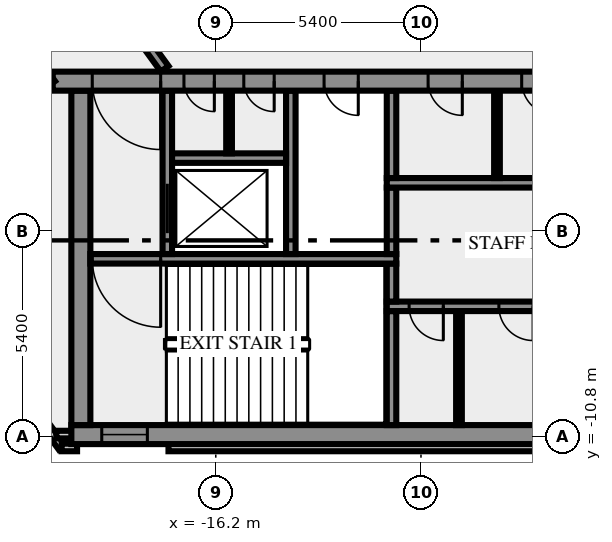
"""IFC4 building model, lengths in metres.
Left out: names, types, materials, properties, quantities, classifications, styles, units other than length and angle.
Written with IfcOpenShell. Run it as: python <this file> out.ifc"""

import sys

from ifc_helpers import new_model, si_unit, direction, frame, frame_2d, origin, place, context, subcontext, project, spatial, rectangle, extrude, element, fill, save


model = new_model("IFC4")
c1 = context("Model", 3, precision=1e-05, world=origin(), true_north=direction((0.0, 1.0)))
c2 = subcontext(c1, "Body", "Model", "MODEL_VIEW")
j1 = project(units=[si_unit("LENGTHUNIT", "METRE"), si_unit("PLANEANGLEUNIT", "RADIAN")], contexts=[c1])
p1 = place(None, origin())
s1 = spatial("IfcSite", under=j1, at=p1, CompositionType="ELEMENT")
p2 = place(p1, origin())
s2 = spatial("IfcBuilding", under=s1, at=p2, CompositionType="ELEMENT")
p3 = place(p2, frame((0.0, 0.0, 226.0)))
s3 = spatial("IfcBuildingStorey", under=s2, at=p3, CompositionType="ELEMENT", Elevation=226.0)
p4 = place(p3, frame((-21.833, -8.909, 0.0), z_axis=(0.0, 0.0, 1.0), x_axis=(0.587766567315, -0.809030569476, 0.0)))
e1 = element("IfcWall", 1, at=p4, inside=s3, PredefinedType="SOLIDWALL", context=c2, shape_type="SweptSolid", body=[
    extrude(rectangle(XDim=2.688, YDim=0.2, at=frame_2d((1.344, 0.0))), origin(), (0.0, 0.0, 1.0), 3.65),
])
p5 = place(p3, frame((-20.256, -11.088, 0.0), z_axis=(0.0, 0.0, 1.0), x_axis=(1.0, 0.0, 0.0)))
e2 = element("IfcWall", 2, at=p5, inside=s3, PredefinedType="SOLIDWALL", context=c2, shape_type="SweptSolid", body=[
    extrude(rectangle(XDim=0.406, YDim=0.2, at=frame_2d((0.203, 0.0))), origin(), (0.0, 0.0, 1.0), 3.65),
])
p6 = place(p3, frame((-17.444, -11.088, 0.0), z_axis=(0.0, 0.0, 1.0), x_axis=(1.0, 0.0, 0.0)))
e3 = element("IfcWall", 3, at=p6, inside=s3, PredefinedType="SOLIDWALL", context=c2, shape_type="SweptSolid", body=[
    extrude(rectangle(XDim=34.888, YDim=0.2, at=frame_2d((17.444, 0.0))), origin(), (0.0, 0.0, 1.0), 3.65),
])
p7 = place(p3, frame((-19.98, -10.75, 0.0), z_axis=(0.0, 0.0, 1.0), x_axis=(-1.0, 0.0, 0.0)))
e4 = element("IfcWall", 4, at=p7, inside=s3, PredefinedType="SOLIDWALL", context=c2, shape_type="SweptSolid", body=[
    extrude(rectangle(XDim=0.417, YDim=0.2, at=frame_2d((0.208, 0.0))), origin(), (0.0, 0.0, 1.0), 3.65),
])
p8 = place(p3, frame((-20.0, -10.75, 0.0), z_axis=(0.0, 0.0, 1.0), x_axis=(1.0, 0.0, 0.0)))
e5 = element("IfcWall", 5, at=p8, inside=s3, PredefinedType="SHEAR", context=c2, shape_type="SweptSolid", body=[
    extrude(rectangle(XDim=40.0, YDim=0.5, at=frame_2d((20.0, 0.0))), origin(), (0.0, 0.0, 1.0), 3.65),
])
p9 = place(p8, frame((0.8, 0.0, 1.0)))
e6 = element("IfcOpeningElement", 6, at=p9, cuts=e5, PredefinedType="OPENING", context=c2, shape_type="SweptSolid", body=[
    extrude(rectangle(XDim=1.2, YDim=1.2, at=frame_2d((0.6, 0.6))), frame((0.0, 0.26, 0.0), z_axis=(0.0, -1.0, 0.0), x_axis=(1.0, 0.0, 0.0)), (0.0, 0.0, 1.0), 0.52),
])
p10 = place(p8, frame((38.0, 0.0, 1.0)))
e7 = element("IfcOpeningElement", 7, at=p10, cuts=e5, PredefinedType="OPENING", context=c2, shape_type="SweptSolid", body=[
    extrude(rectangle(XDim=1.2, YDim=1.2, at=frame_2d((0.6, 0.6))), frame((0.0, 0.26, 0.0), z_axis=(0.0, -1.0, 0.0), x_axis=(1.0, 0.0, 0.0)), (0.0, 0.0, 1.0), 0.52),
])
p11 = place(p3, frame((-19.75, -10.5, 0.0), z_axis=(0.0, 0.0, 1.0), x_axis=(0.0, 1.0, 0.0)))
e8 = element("IfcWall", 8, at=p11, inside=s3, PredefinedType="SHEAR", context=c2, shape_type="SweptSolid", body=[
    extrude(rectangle(XDim=8.8, YDim=0.5, at=frame_2d((4.4, 0.0))), origin(), (0.0, 0.0, 1.0), 3.65),
])
p12 = place(p3, frame((-11.575, -10.5, 0.0), z_axis=(0.0, 0.0, 1.0), x_axis=(0.0, 1.0, 0.0)))
e9 = element("IfcWall", 9, at=p12, inside=s3, PredefinedType="SHEAR", context=c2, shape_type="SweptSolid", body=[
    extrude(rectangle(XDim=3.0, YDim=0.25, at=frame_2d((1.5, 0.0))), origin(), (0.0, 0.0, 1.0), 3.65),
])
p13 = place(p3, frame((-9.8, -10.5, 0.0), z_axis=(0.0, 0.0, 1.0), x_axis=(0.0, 1.0, 0.0)))
e10 = element("IfcWall", 10, at=p13, inside=s3, PredefinedType="PARTITIONING", context=c2, shape_type="SweptSolid", body=[
    extrude(rectangle(XDim=3.0, YDim=0.15, at=frame_2d((1.5, 0.0))), origin(), (0.0, 0.0, 1.0), 3.65),
])
p14 = place(p3, frame((11.7, -7.375, 0.0), z_axis=(0.0, 0.0, 1.0), x_axis=(-1.0, 0.0, 0.0)))
e11 = element("IfcWall", 11, at=p14, inside=s3, PredefinedType="SHEAR", context=c2, shape_type="SweptSolid", body=[
    extrude(rectangle(XDim=23.4, YDim=0.25, at=frame_2d((11.7, 0.0))), origin(), (0.0, 0.0, 1.0), 3.65),
])
p15 = place(p14, frame((21.912, 0.0, 0.0)))
e12 = element("IfcOpeningElement", 12, at=p15, cuts=e11, PredefinedType="OPENING", context=c2, shape_type="SweptSolid", body=[
    extrude(rectangle(XDim=0.9, YDim=2.1, at=frame_2d((0.45, 1.05))), frame((0.0, 0.135, 0.0), z_axis=(0.0, -1.0, 0.0), x_axis=(1.0, 0.0, 0.0)), (0.0, 0.0, 1.0), 0.27),
])
p16 = place(p14, frame((19.55, 0.0, 0.0)))
e13 = element("IfcOpeningElement", 13, at=p16, cuts=e11, PredefinedType="OPENING", context=c2, shape_type="SweptSolid", body=[
    extrude(rectangle(XDim=0.9, YDim=2.1, at=frame_2d((0.45, 1.05))), frame((0.0, 0.135, 0.0), z_axis=(0.0, -1.0, 0.0), x_axis=(1.0, 0.0, 0.0)), (0.0, 0.0, 1.0), 0.27),
])
p17 = place(p14, frame((16.688, 0.0, 0.0)))
e14 = element("IfcOpeningElement", 14, at=p17, cuts=e11, PredefinedType="OPENING", context=c2, shape_type="SweptSolid", body=[
    extrude(rectangle(XDim=0.9, YDim=2.1, at=frame_2d((0.45, 1.05))), frame((0.0, 0.135, 0.0), z_axis=(0.0, -1.0, 0.0), x_axis=(1.0, 0.0, 0.0)), (0.0, 0.0, 1.0), 0.27),
])
p18 = place(p14, frame((14.4, 0.0, 0.0)))
e15 = element("IfcOpeningElement", 15, at=p18, cuts=e11, PredefinedType="OPENING", context=c2, shape_type="SweptSolid", body=[
    extrude(rectangle(XDim=0.9, YDim=2.1, at=frame_2d((0.45, 1.05))), frame((0.0, 0.135, 0.0), z_axis=(0.0, -1.0, 0.0), x_axis=(1.0, 0.0, 0.0)), (0.0, 0.0, 1.0), 0.27),
])
p19 = place(p14, frame((12.5, 0.0, 0.0)))
e16 = element("IfcOpeningElement", 16, at=p19, cuts=e11, PredefinedType="OPENING", context=c2, shape_type="SweptSolid", body=[
    extrude(rectangle(XDim=0.9, YDim=2.1, at=frame_2d((0.45, 1.05))), frame((0.0, 0.135, 0.0), z_axis=(0.0, -1.0, 0.0), x_axis=(1.0, 0.0, 0.0)), (0.0, 0.0, 1.0), 0.27),
])
p20 = place(p14, frame((10.6, 0.0, 0.0)))
e17 = element("IfcOpeningElement", 17, at=p20, cuts=e11, PredefinedType="OPENING", context=c2, shape_type="SweptSolid", body=[
    extrude(rectangle(XDim=0.9, YDim=2.1, at=frame_2d((0.45, 1.05))), frame((0.0, 0.135, 0.0), z_axis=(0.0, -1.0, 0.0), x_axis=(1.0, 0.0, 0.0)), (0.0, 0.0, 1.0), 0.27),
])
p21 = place(p14, frame((8.35, 0.0, 0.0)))
e18 = element("IfcOpeningElement", 18, at=p21, cuts=e11, PredefinedType="OPENING", context=c2, shape_type="SweptSolid", body=[
    extrude(rectangle(XDim=1.1, YDim=2.1, at=frame_2d((0.55, 1.05))), frame((0.0, 0.135, 0.0), z_axis=(0.0, -1.0, 0.0), x_axis=(1.0, 0.0, 0.0)), (0.0, 0.0, 1.0), 0.27),
])
p22 = place(p14, frame((5.85, 0.0, 0.0)))
e19 = element("IfcOpeningElement", 19, at=p22, cuts=e11, PredefinedType="OPENING", context=c2, shape_type="SweptSolid", body=[
    extrude(rectangle(XDim=1.1, YDim=2.1, at=frame_2d((0.55, 1.05))), frame((0.0, 0.135, 0.0), z_axis=(0.0, -1.0, 0.0), x_axis=(1.0, 0.0, 0.0)), (0.0, 0.0, 1.0), 0.27),
])
p23 = place(p14, frame((3.35, 0.0, 0.0)))
e20 = element("IfcOpeningElement", 20, at=p23, cuts=e11, PredefinedType="OPENING", context=c2, shape_type="SweptSolid", body=[
    extrude(rectangle(XDim=1.1, YDim=2.1, at=frame_2d((0.55, 1.05))), frame((0.0, 0.135, 0.0), z_axis=(0.0, -1.0, 0.0), x_axis=(1.0, 0.0, 0.0)), (0.0, 0.0, 1.0), 0.27),
])
p24 = place(p14, frame((0.85, 0.0, 0.0)))
e21 = element("IfcOpeningElement", 21, at=p24, cuts=e11, PredefinedType="OPENING", context=c2, shape_type="SweptSolid", body=[
    extrude(rectangle(XDim=1.1, YDim=2.1, at=frame_2d((0.55, 1.05))), frame((0.0, 0.135, 0.0), z_axis=(0.0, -1.0, 0.0), x_axis=(1.0, 0.0, 0.0)), (0.0, 0.0, 1.0), 0.27),
])
p25 = place(p3, frame((-11.575, -7.25, 0.0), z_axis=(0.0, 0.0, 1.0), x_axis=(0.0, 1.0, 0.0)))
e22 = element("IfcWall", 22, at=p25, inside=s3, PredefinedType="SHEAR", context=c2, shape_type="SweptSolid", body=[
    extrude(rectangle(XDim=1.0, YDim=0.25, at=frame_2d((0.5, 0.0))), origin(), (0.0, 0.0, 1.0), 3.65),
])
p26 = place(p3, frame((-11.45, -6.125, 0.0), z_axis=(0.0, 0.0, 1.0), x_axis=(-1.0, 0.0, 0.0)))
e23 = element("IfcWall", 23, at=p26, inside=s3, PredefinedType="SHEAR", context=c2, shape_type="SweptSolid", body=[
    extrude(rectangle(XDim=8.05, YDim=0.25, at=frame_2d((4.025, 0.0))), origin(), (0.0, 0.0, 1.0), 3.65),
])
p27 = place(p26, frame((6.2, 0.0, 0.0)))
e24 = element("IfcOpeningElement", 24, at=p27, cuts=e23, PredefinedType="OPENING", context=c2, shape_type="SweptSolid", body=[
    extrude(rectangle(XDim=1.8, YDim=2.1, at=frame_2d((0.9, 1.05))), frame((0.0, 0.135, 0.0), z_axis=(0.0, -1.0, 0.0), x_axis=(1.0, 0.0, 0.0)), (0.0, 0.0, 1.0), 0.27),
])
p28 = place(p3, frame((-17.475, -6.0, 0.0), z_axis=(0.0, 0.0, 1.0), x_axis=(0.0, 1.0, 0.0)))
e25 = element("IfcWall", 25, at=p28, inside=s3, PredefinedType="SHEAR", context=c2, shape_type="SweptSolid", body=[
    extrude(rectangle(XDim=4.3, YDim=0.25, at=frame_2d((2.15, 0.0))), origin(), (0.0, 0.0, 1.0), 3.65),
])
p29 = place(p28, frame((0.55, 0.0, 0.0)))
e26 = element("IfcOpeningElement", 26, at=p29, cuts=e25, PredefinedType="OPENING", context=c2, shape_type="SweptSolid", body=[
    extrude(rectangle(XDim=1.3, YDim=2.1, at=frame_2d((0.65, 1.05))), frame((0.0, 0.135, 0.0), z_axis=(0.0, -1.0, 0.0), x_axis=(1.0, 0.0, 0.0)), (0.0, 0.0, 1.0), 0.27),
])
p30 = place(p3, frame((-14.225, -6.0, 0.0), z_axis=(0.0, 0.0, 1.0), x_axis=(0.0, 1.0, 0.0)))
e27 = element("IfcWall", 27, at=p30, inside=s3, PredefinedType="SHEAR", context=c2, shape_type="SweptSolid", body=[
    extrude(rectangle(XDim=4.3, YDim=0.25, at=frame_2d((2.15, 0.0))), origin(), (0.0, 0.0, 1.0), 3.65),
])
p31 = place(p3, frame((-11.575, -6.0, 0.0), z_axis=(0.0, 0.0, 1.0), x_axis=(0.0, 1.0, 0.0)))
e28 = element("IfcWall", 28, at=p31, inside=s3, PredefinedType="SHEAR", context=c2, shape_type="SweptSolid", body=[
    extrude(rectangle(XDim=1.75, YDim=0.25, at=frame_2d((0.875, 0.0))), origin(), (0.0, 0.0, 1.0), 3.65),
])
p32 = place(p3, frame((-11.7, -4.125, 0.0), z_axis=(0.0, 0.0, 1.0), x_axis=(1.0, 0.0, 0.0)))
e29 = element("IfcWall", 29, at=p32, inside=s3, PredefinedType="SHEAR", context=c2, shape_type="SweptSolid", body=[
    extrude(rectangle(XDim=7.75, YDim=0.25, at=frame_2d((3.875, 0.0))), origin(), (0.0, 0.0, 1.0), 3.65),
])
p33 = place(p3, frame((-11.575, -4.0, 0.0), z_axis=(0.0, 0.0, 1.0), x_axis=(0.0, 1.0, 0.0)))
e30 = element("IfcWall", 30, at=p33, inside=s3, PredefinedType="SHEAR", context=c2, shape_type="SweptSolid", body=[
    extrude(rectangle(XDim=2.3, YDim=0.25, at=frame_2d((1.15, 0.0))), origin(), (0.0, 0.0, 1.0), 3.65),
])
p34 = place(p3, frame((-8.8, -4.0, 0.0), z_axis=(0.0, 0.0, 1.0), x_axis=(0.0, 1.0, 0.0)))
e31 = element("IfcWall", 31, at=p34, inside=s3, PredefinedType="PARTITIONING", context=c2, shape_type="SweptSolid", body=[
    extrude(rectangle(XDim=2.3, YDim=0.15, at=frame_2d((1.15, 0.0))), origin(), (0.0, 0.0, 1.0), 3.65),
])
p35 = place(p3, frame((-17.35, -3.475, 0.0), z_axis=(0.0, 0.0, 1.0), x_axis=(1.0, 0.0, 0.0)))
e32 = element("IfcWall", 32, at=p35, inside=s3, PredefinedType="SHEAR", context=c2, shape_type="SweptSolid", body=[
    extrude(rectangle(XDim=3.0, YDim=0.25, at=frame_2d((1.5, 0.0))), origin(), (0.0, 0.0, 1.0), 3.65),
])
p36 = place(p3, frame((-15.85, -3.35, 0.0), z_axis=(0.0, 0.0, 1.0), x_axis=(0.0, 1.0, 0.0)))
e33 = element("IfcWall", 33, at=p36, inside=s3, PredefinedType="PARTITIONING", context=c2, shape_type="SweptSolid", body=[
    extrude(rectangle(XDim=1.65, YDim=0.15, at=frame_2d((0.825, 0.0))), origin(), (0.0, 0.0, 1.0), 3.65),
])
p37 = place(p3, frame((20.49, -1.45, 0.0), z_axis=(0.0, 0.0, 1.0), x_axis=(-1.0, 0.0, 0.0)))
e34 = element("IfcWall", 34, at=p37, inside=s3, PredefinedType="SHEAR", context=c2, shape_type="SweptSolid", body=[
    extrude(rectangle(XDim=40.98, YDim=0.5, at=frame_2d((20.49, 0.0))), origin(), (0.0, 0.0, 1.0), 3.65),
])
p38 = place(p37, frame((38.14, 0.0, 0.0)))
e35 = element("IfcOpeningElement", 35, at=p38, cuts=e34, PredefinedType="OPENING", context=c2, shape_type="SweptSolid", body=[
    extrude(rectangle(XDim=1.8, YDim=2.1, at=frame_2d((0.9, 1.05))), frame((0.0, 0.26, 0.0), z_axis=(0.0, -1.0, 0.0), x_axis=(1.0, 0.0, 0.0)), (0.0, 0.0, 1.0), 0.52),
])
p39 = place(p37, frame((36.728, 0.0, 0.0)))
e36 = element("IfcOpeningElement", 36, at=p39, cuts=e34, PredefinedType="OPENING", context=c2, shape_type="SweptSolid", body=[
    extrude(rectangle(XDim=0.8, YDim=2.1, at=frame_2d((0.4, 1.05))), frame((0.0, 0.26, 0.0), z_axis=(0.0, -1.0, 0.0), x_axis=(1.0, 0.0, 0.0)), (0.0, 0.0, 1.0), 0.52),
])
p40 = place(p37, frame((35.153, 0.0, 0.0)))
e37 = element("IfcOpeningElement", 37, at=p40, cuts=e34, PredefinedType="OPENING", context=c2, shape_type="SweptSolid", body=[
    extrude(rectangle(XDim=0.8, YDim=2.1, at=frame_2d((0.4, 1.05))), frame((0.0, 0.26, 0.0), z_axis=(0.0, -1.0, 0.0), x_axis=(1.0, 0.0, 0.0)), (0.0, 0.0, 1.0), 0.52),
])
p41 = place(p37, frame((32.94, 0.0, 0.0)))
e38 = element("IfcOpeningElement", 38, at=p41, cuts=e34, PredefinedType="OPENING", context=c2, shape_type="SweptSolid", body=[
    extrude(rectangle(XDim=0.9, YDim=2.1, at=frame_2d((0.45, 1.05))), frame((0.0, 0.26, 0.0), z_axis=(0.0, -1.0, 0.0), x_axis=(1.0, 0.0, 0.0)), (0.0, 0.0, 1.0), 0.52),
])
p42 = place(p37, frame((30.202, 0.0, 0.0)))
e39 = element("IfcOpeningElement", 39, at=p42, cuts=e34, PredefinedType="OPENING", context=c2, shape_type="SweptSolid", body=[
    extrude(rectangle(XDim=0.9, YDim=2.1, at=frame_2d((0.45, 1.05))), frame((0.0, 0.26, 0.0), z_axis=(0.0, -1.0, 0.0), x_axis=(1.0, 0.0, 0.0)), (0.0, 0.0, 1.0), 0.52),
])
p43 = place(p37, frame((27.74, 0.0, 0.0)))
e40 = element("IfcOpeningElement", 40, at=p43, cuts=e34, PredefinedType="OPENING", context=c2, shape_type="SweptSolid", body=[
    extrude(rectangle(XDim=0.9, YDim=2.1, at=frame_2d((0.45, 1.05))), frame((0.0, 0.26, 0.0), z_axis=(0.0, -1.0, 0.0), x_axis=(1.0, 0.0, 0.0)), (0.0, 0.0, 1.0), 0.52),
])
p44 = place(p37, frame((25.377, 0.0, 0.0)))
e41 = element("IfcOpeningElement", 41, at=p44, cuts=e34, PredefinedType="OPENING", context=c2, shape_type="SweptSolid", body=[
    extrude(rectangle(XDim=0.9, YDim=2.1, at=frame_2d((0.45, 1.05))), frame((0.0, 0.26, 0.0), z_axis=(0.0, -1.0, 0.0), x_axis=(1.0, 0.0, 0.0)), (0.0, 0.0, 1.0), 0.52),
])
p45 = place(p37, frame((20.74, 0.0, 0.0)))
e42 = element("IfcOpeningElement", 42, at=p45, cuts=e34, PredefinedType="OPENING", context=c2, shape_type="SweptSolid", body=[
    extrude(rectangle(XDim=2.0, YDim=2.1, at=frame_2d((1.0, 1.05))), frame((0.0, 0.26, 0.0), z_axis=(0.0, -1.0, 0.0), x_axis=(1.0, 0.0, 0.0)), (0.0, 0.0, 1.0), 0.52),
])
p46 = place(p37, frame((7.14, 0.0, 0.0)))
e43 = element("IfcOpeningElement", 43, at=p46, cuts=e34, PredefinedType="OPENING", context=c2, shape_type="SweptSolid", body=[
    extrude(rectangle(XDim=0.9, YDim=2.1, at=frame_2d((0.45, 1.05))), frame((0.0, 0.26, 0.0), z_axis=(0.0, -1.0, 0.0), x_axis=(1.0, 0.0, 0.0)), (0.0, 0.0, 1.0), 0.52),
])
p47 = place(p37, frame((4.19, 0.0, 0.0)))
e44 = element("IfcOpeningElement", 44, at=p47, cuts=e34, PredefinedType="OPENING", context=c2, shape_type="SweptSolid", body=[
    extrude(rectangle(XDim=0.9, YDim=2.1, at=frame_2d((0.45, 1.05))), frame((0.0, 0.26, 0.0), z_axis=(0.0, -1.0, 0.0), x_axis=(1.0, 0.0, 0.0)), (0.0, 0.0, 1.0), 0.52),
])
p48 = place(p37, frame((1.04, 0.0, 0.0)))
e45 = element("IfcOpeningElement", 45, at=p48, cuts=e34, PredefinedType="OPENING", context=c2, shape_type="SweptSolid", body=[
    extrude(rectangle(XDim=1.8, YDim=2.1, at=frame_2d((0.9, 1.05))), frame((0.0, 0.26, 0.0), z_axis=(0.0, -1.0, 0.0), x_axis=(1.0, 0.0, 0.0)), (0.0, 0.0, 1.0), 0.52),
])
p49 = place(p3, frame((-20.531, -1.523, 0.0), z_axis=(0.0, 0.0, 1.0), x_axis=(-0.587784239999, 0.809017729849, 0.0)))
e46 = element("IfcWall", 46, at=p49, inside=s3, PredefinedType="SOLIDWALL", context=c2, shape_type="SweptSolid", body=[
    extrude(rectangle(XDim=23.271, YDim=0.25, at=frame_2d((11.635, 0.0))), origin(), (0.0, 0.0, 1.0), 3.65),
])
p50 = place(p49, frame((0.533, 0.0, 0.0)))
e47 = element("IfcOpeningElement", 47, at=p50, cuts=e46, PredefinedType="OPENING", context=c2, shape_type="SweptSolid", body=[
    extrude(rectangle(XDim=0.9, YDim=2.1, at=frame_2d((0.45, 1.05))), frame((0.0, 0.135, 0.0), z_axis=(0.0, -1.0, 0.0), x_axis=(1.0, 0.0, 0.0)), (0.0, 0.0, 1.0), 0.27),
])
p51 = place(p49, frame((17.106, 0.0, 0.0)))
e48 = element("IfcOpeningElement", 48, at=p51, cuts=e46, PredefinedType="OPENING", context=c2, shape_type="SweptSolid", body=[
    extrude(rectangle(XDim=1.8, YDim=2.1, at=frame_2d((0.9, 1.05))), frame((0.0, 0.135, 0.0), z_axis=(0.0, -1.0, 0.0), x_axis=(1.0, 0.0, 0.0)), (0.0, 0.0, 1.0), 0.27),
])
p52 = place(p49, frame((10.516, 0.0, 0.0)))
e49 = element("IfcOpeningElement", 49, at=p52, cuts=e46, PredefinedType="OPENING", context=c2, shape_type="SweptSolid", body=[
    extrude(rectangle(XDim=0.9, YDim=2.1, at=frame_2d((0.45, 1.05))), frame((0.0, 0.135, 0.0), z_axis=(0.0, -1.0, 0.0), x_axis=(1.0, 0.0, 0.0)), (0.0, 0.0, 1.0), 0.27),
])
p53 = place(p3, frame((-31.918, 18.658, 0.0), z_axis=(0.0, 0.0, 1.0), x_axis=(0.587788731405, -0.80901446664, 0.0)))
e50 = element("IfcWall", 50, at=p53, inside=s3, PredefinedType="SOLIDWALL", context=c2, shape_type="SweptSolid", body=[
    extrude(rectangle(XDim=24.453, YDim=0.25, at=frame_2d((12.227, 0.0))), origin(), (0.0, 0.0, 1.0), 3.65),
])
p54 = place(p53, frame((8.395, 0.0, 0.0)))
e51 = element("IfcOpeningElement", 51, at=p54, cuts=e50, PredefinedType="OPENING", context=c2, shape_type="SweptSolid", body=[
    extrude(rectangle(XDim=1.0, YDim=2.1, at=frame_2d((0.5, 1.05))), frame((0.0, 0.135, 0.0), z_axis=(0.0, -1.0, 0.0), x_axis=(1.0, 0.0, 0.0)), (0.0, 0.0, 1.0), 0.27),
])
p55 = place(p53, frame((10.095, 0.0, 0.0)))
e52 = element("IfcOpeningElement", 52, at=p55, cuts=e50, PredefinedType="OPENING", context=c2, shape_type="SweptSolid", body=[
    extrude(rectangle(XDim=0.9, YDim=2.1, at=frame_2d((0.45, 1.05))), frame((0.0, 0.135, 0.0), z_axis=(0.0, -1.0, 0.0), x_axis=(1.0, 0.0, 0.0)), (0.0, 0.0, 1.0), 0.27),
])
p56 = place(p9, origin())
e53 = element("IfcWindow", 53, at=p56, inside=s3, PartitioningType="SINGLE_PANEL", PredefinedType="WINDOW", context=c2, shape_type="SweptSolid", body=[
    extrude(rectangle(XDim=1.2, YDim=1.2, at=frame_2d((0.6, 0.6))), frame((0.0, 0.03, 0.0), z_axis=(0.0, -1.0, 0.0), x_axis=(1.0, 0.0, 0.0)), (0.0, 0.0, 1.0), 0.06),
])
fill(e6, e53)
p57 = place(p15, origin())
e54 = element("IfcDoor", 54, at=p57, inside=s3, OperationType="SINGLE_SWING_RIGHT", PredefinedType="DOOR", context=c2, shape_type="SweptSolid", body=[
    extrude(rectangle(XDim=0.9, YDim=2.1, at=frame_2d((0.45, 1.05))), frame((0.0, 0.025, 0.0), z_axis=(0.0, -1.0, 0.0), x_axis=(1.0, 0.0, 0.0)), (0.0, 0.0, 1.0), 0.05),
])
fill(e12, e54)
p58 = place(p16, origin())
e55 = element("IfcDoor", 55, at=p58, inside=s3, OperationType="SINGLE_SWING_RIGHT", PredefinedType="DOOR", context=c2, shape_type="SweptSolid", body=[
    extrude(rectangle(XDim=0.9, YDim=2.1, at=frame_2d((0.45, 1.05))), frame((0.0, 0.025, 0.0), z_axis=(0.0, -1.0, 0.0), x_axis=(1.0, 0.0, 0.0)), (0.0, 0.0, 1.0), 0.05),
])
fill(e13, e55)
p59 = place(p27, origin())
e56 = element("IfcDoor", 56, at=p59, inside=s3, OperationType="DOUBLE_DOOR_SINGLE_SWING", PredefinedType="DOOR", context=c2, shape_type="SweptSolid", body=[
    extrude(rectangle(XDim=1.8, YDim=2.1, at=frame_2d((0.9, 1.05))), frame((0.0, 0.025, 0.0), z_axis=(0.0, -1.0, 0.0), x_axis=(1.0, 0.0, 0.0)), (0.0, 0.0, 1.0), 0.05),
])
fill(e24, e56)
p60 = place(p29, origin())
e57 = element("IfcDoor", 57, at=p60, inside=s3, OperationType="DOUBLE_DOOR_SLIDING", PredefinedType="DOOR", context=c2, shape_type="SweptSolid", body=[
    extrude(rectangle(XDim=1.3, YDim=2.1, at=frame_2d((0.65, 1.05))), frame((0.0, 0.025, 0.0), z_axis=(0.0, -1.0, 0.0), x_axis=(1.0, 0.0, 0.0)), (0.0, 0.0, 1.0), 0.05),
])
fill(e26, e57)
p61 = place(p38, origin())
e58 = element("IfcDoor", 58, at=p61, inside=s3, OperationType="DOUBLE_DOOR_SINGLE_SWING", PredefinedType="DOOR", context=c2, shape_type="SweptSolid", body=[
    extrude(rectangle(XDim=1.8, YDim=2.1, at=frame_2d((0.9, 1.05))), frame((0.0, 0.025, 0.0), z_axis=(0.0, -1.0, 0.0), x_axis=(1.0, 0.0, 0.0)), (0.0, 0.0, 1.0), 0.05),
])
fill(e35, e58)
p62 = place(p39, origin())
e59 = element("IfcDoor", 59, at=p62, inside=s3, OperationType="SINGLE_SWING_RIGHT", PredefinedType="DOOR", context=c2, shape_type="SweptSolid", body=[
    extrude(rectangle(XDim=0.8, YDim=2.1, at=frame_2d((0.4, 1.05))), frame((0.0, 0.025, 0.0), z_axis=(0.0, -1.0, 0.0), x_axis=(1.0, 0.0, 0.0)), (0.0, 0.0, 1.0), 0.05),
])
fill(e36, e59)
p63 = place(p40, origin())
e60 = element("IfcDoor", 60, at=p63, inside=s3, OperationType="SINGLE_SWING_RIGHT", PredefinedType="DOOR", context=c2, shape_type="SweptSolid", body=[
    extrude(rectangle(XDim=0.8, YDim=2.1, at=frame_2d((0.4, 1.05))), frame((0.0, 0.025, 0.0), z_axis=(0.0, -1.0, 0.0), x_axis=(1.0, 0.0, 0.0)), (0.0, 0.0, 1.0), 0.05),
])
fill(e37, e60)
p64 = place(p41, origin())
e61 = element("IfcDoor", 61, at=p64, inside=s3, OperationType="SINGLE_SWING_RIGHT", PredefinedType="DOOR", context=c2, shape_type="SweptSolid", body=[
    extrude(rectangle(XDim=0.9, YDim=2.1, at=frame_2d((0.45, 1.05))), frame((0.0, 0.025, 0.0), z_axis=(0.0, -1.0, 0.0), x_axis=(1.0, 0.0, 0.0)), (0.0, 0.0, 1.0), 0.05),
])
fill(e38, e61)
p65 = place(p42, origin())
e62 = element("IfcDoor", 62, at=p65, inside=s3, OperationType="SINGLE_SWING_RIGHT", PredefinedType="DOOR", context=c2, shape_type="SweptSolid", body=[
    extrude(rectangle(XDim=0.9, YDim=2.1, at=frame_2d((0.45, 1.05))), frame((0.0, 0.025, 0.0), z_axis=(0.0, -1.0, 0.0), x_axis=(1.0, 0.0, 0.0)), (0.0, 0.0, 1.0), 0.05),
])
fill(e39, e62)
p66 = place(p43, origin())
e63 = element("IfcDoor", 63, at=p66, inside=s3, OperationType="SINGLE_SWING_RIGHT", PredefinedType="DOOR", context=c2, shape_type="SweptSolid", body=[
    extrude(rectangle(XDim=0.9, YDim=2.1, at=frame_2d((0.45, 1.05))), frame((0.0, 0.025, 0.0), z_axis=(0.0, -1.0, 0.0), x_axis=(1.0, 0.0, 0.0)), (0.0, 0.0, 1.0), 0.05),
])
fill(e40, e63)
save(model, sys.argv[1])
